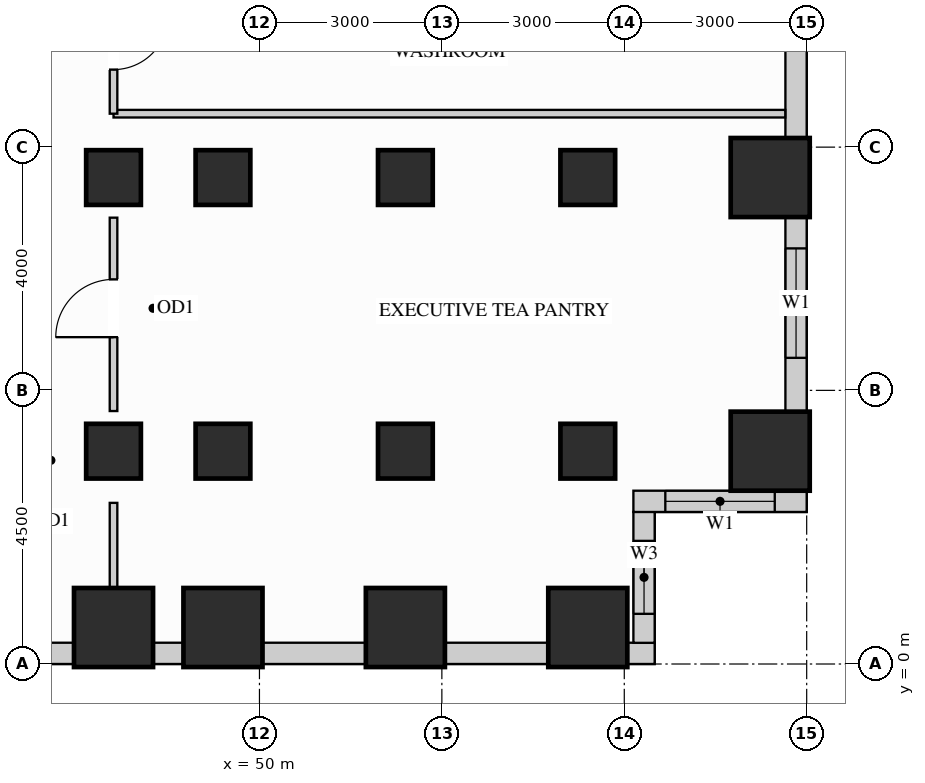
"""IFC4 building model, lengths in metres.
Left out: names, types, materials, properties, quantities, classifications, styles, units other than length and angle.
Written with IfcOpenShell. Run it as: python <this file> out.ifc"""

import sys

from ifc_helpers import new_model, si_unit, direction, frame, frame_2d, origin, origin_2d, place, context, subcontext, project, spatial, rectangle, extrude, source, transform, mapped, element, fill, save


model = new_model("IFC4")
c1 = context("Model", 3, precision=1e-05, world=origin(), true_north=direction((0.0, 1.0)))
c2 = subcontext(c1, "Body", "Model", "MODEL_VIEW")
j1 = project(units=[si_unit("LENGTHUNIT", "METRE"), si_unit("PLANEANGLEUNIT", "RADIAN")], contexts=[c1])
p1 = place(None, origin())
s1 = spatial("IfcSite", under=j1, at=p1, CompositionType="ELEMENT")
p2 = place(p1, origin())
s2 = spatial("IfcBuilding", under=s1, at=p2, CompositionType="ELEMENT")
p3 = place(p2, frame((0.0, 0.0, 69.3)))
s3 = spatial("IfcBuildingStorey", under=s2, at=p3, CompositionType="ELEMENT", Elevation=69.3)
m1 = source(origin(), c2, "Body", "SweptSolid", [
    extrude(rectangle(XDim=0.9, YDim=0.9, at=origin_2d()), origin(), (0.0, 0.0, 1.0), 3.32),
])
for number, where, z_axis, x_axis in (
    (1, (47.6, 3.5, 0.0), (0.0, 0.0, 1.0), (1.0, 0.0, 0.0)),
    (2, (47.6, 8.0, 0.0), (0.0, 0.0, 1.0), (1.0, 0.0, 0.0)),
    (3, (49.4, 3.5, 0.0), (0.0, 0.0, 1.0), (1.0, 0.0, 0.0)),
    (4, (49.4, 8.0, 0.0), (0.0, 0.0, 1.0), (1.0, 0.0, 0.0)),
    (5, (52.4, 3.5, 0.0), (0.0, 0.0, 1.0), (1.0, 0.0, 0.0)),
    (6, (52.4, 8.0, 0.0), (0.0, 0.0, 1.0), (1.0, 0.0, 0.0)),
    (7, (55.4, 3.5, 0.0), (0.0, 0.0, 1.0), (1.0, 0.0, 0.0)),
    (8, (55.4, 8.0, 0.0), (0.0, 0.0, 1.0), (1.0, 0.0, 0.0)),
):
    element("IfcColumn", number, at=place(p3, frame(where, z_axis=z_axis, x_axis=x_axis)), inside=s3, PredefinedType="COLUMN", context=c2, shape_type="MappedRepresentation", body=[
        mapped(m1, transform((0.0, 0.0, 0.0), x_axis=(1.0, 0.0, 0.0), y_axis=(0.0, 1.0, 0.0), z_axis=(0.0, 0.0, 1.0))),
    ])
m2 = source(origin(), c2, "Body", "SweptSolid", [
    extrude(rectangle(XDim=1.3, YDim=1.3, at=origin_2d()), origin(), (0.0, 0.0, 1.0), 3.32),
])
for number, where, z_axis, x_axis in (
    (9, (58.4, 3.5, 0.0), (0.0, 0.0, 1.0), (1.0, 0.0, 0.0)),
    (10, (58.4, 8.0, 0.0), (0.0, 0.0, 1.0), (1.0, 0.0, 0.0)),
    (11, (47.6, 0.6, 0.0), (0.0, 0.0, 1.0), (1.0, 0.0, 0.0)),
    (12, (49.4, 0.6, 0.0), (0.0, 0.0, 1.0), (1.0, 0.0, 0.0)),
    (13, (52.4, 0.6, 0.0), (0.0, 0.0, 1.0), (1.0, 0.0, 0.0)),
    (14, (55.4, 0.6, 0.0), (0.0, 0.0, 1.0), (1.0, 0.0, 0.0)),
):
    element("IfcColumn", number, at=place(p3, frame(where, z_axis=z_axis, x_axis=x_axis)), inside=s3, PredefinedType="COLUMN", context=c2, shape_type="MappedRepresentation", body=[
        mapped(m2, transform((0.0, 0.0, 0.0), x_axis=(1.0, 0.0, 0.0), y_axis=(0.0, 1.0, 0.0), z_axis=(0.0, 0.0, 1.0))),
    ])
p4 = place(p3, frame((40.648, 0.175, 0.0), z_axis=(0.0, 0.0, 1.0), x_axis=(1.0, 0.0, 0.0)))
e15 = element("IfcWall", 15, at=p4, inside=s3, PredefinedType="SOLIDWALL", context=c2, shape_type="SweptSolid", body=[
    extrude(rectangle(XDim=6.304, YDim=0.35, at=frame_2d((3.152, 0.0))), origin(), (0.0, 0.0, 1.0), 2.45),
])
p5 = place(p4, frame((0.687, 0.0, 0.78)))
e16 = element("IfcOpeningElement", 16, at=p5, cuts=e15, PredefinedType="OPENING", context=c2, shape_type="SweptSolid", body=[
    extrude(rectangle(XDim=1.8, YDim=1.49, at=frame_2d((0.9, 0.745))), frame((0.0, 0.185, 0.0), z_axis=(0.0, -1.0, 0.0), x_axis=(1.0, 0.0, 0.0)), (0.0, 0.0, 1.0), 0.37),
])
p6 = place(p4, frame((2.855, 0.0, 0.78)))
e17 = element("IfcOpeningElement", 17, at=p6, cuts=e15, PredefinedType="OPENING", context=c2, shape_type="SweptSolid", body=[
    extrude(rectangle(XDim=1.8, YDim=1.49, at=frame_2d((0.9, 0.745))), frame((0.0, 0.185, 0.0), z_axis=(0.0, -1.0, 0.0), x_axis=(1.0, 0.0, 0.0)), (0.0, 0.0, 1.0), 0.37),
])
m3 = source(origin(), c2, "Body", "SweptSolid", [
    extrude(rectangle(XDim=0.504, YDim=0.35, at=frame_2d((0.252, 0.0))), origin(), (0.0, 0.0, 1.0), 3.305),
])
p7 = place(p3, frame((48.248, 0.175, 0.0), z_axis=(0.0, 0.0, 1.0), x_axis=(1.0, 0.0, 0.0)))
e18 = element("IfcWall", 18, at=p7, inside=s3, PredefinedType="SOLIDWALL", context=c2, shape_type="MappedRepresentation", body=[
    mapped(m3, transform((0.0, 0.0, 0.0), x_axis=(1.0, 0.0, 0.0), y_axis=(0.0, 1.0, 0.0), z_axis=(0.0, 0.0, 1.0))),
])
m4 = source(origin(), c2, "Body", "SweptSolid", [
    extrude(rectangle(XDim=1.704, YDim=0.35, at=frame_2d((0.852, 0.0))), origin(), (0.0, 0.0, 1.0), 2.45),
])
for number, where, z_axis, x_axis in (
    (19, (50.048, 0.175, 0.0), (0.0, 0.0, 1.0), (1.0, 0.0, 0.0)),
    (20, (53.048, 0.175, 0.0), (0.0, 0.0, 1.0), (1.0, 0.0, 0.0)),
):
    element("IfcWall", number, at=place(p3, frame(where, z_axis=z_axis, x_axis=x_axis)), inside=s3, PredefinedType="SOLIDWALL", context=c2, shape_type="MappedRepresentation", body=[
        mapped(m4, transform((0.0, 0.0, 0.0), x_axis=(1.0, 0.0, 0.0), y_axis=(0.0, 1.0, 0.0), z_axis=(0.0, 0.0, 1.0))),
    ])
m5 = source(origin(), c2, "Body", "SweptSolid", [
    extrude(rectangle(XDim=0.452, YDim=0.35, at=frame_2d((0.226, 0.0))), origin(), (0.0, 0.0, 1.0), 3.305),
])
p8 = place(p3, frame((56.048, 0.175, 0.0), z_axis=(0.0, 0.0, 1.0), x_axis=(1.0, 0.0, 0.0)))
e21 = element("IfcWall", 21, at=p8, inside=s3, PredefinedType="SOLIDWALL", context=c2, shape_type="MappedRepresentation", body=[
    mapped(m5, transform((0.0, 0.0, 0.0), x_axis=(1.0, 0.0, 0.0), y_axis=(0.0, 1.0, 0.0), z_axis=(0.0, 0.0, 1.0))),
])
p9 = place(p3, frame((56.325, 0.348, 0.0), z_axis=(0.0, 0.0, 1.0), x_axis=(0.0, 1.0, 0.0)))
e22 = element("IfcWall", 22, at=p9, inside=s3, PredefinedType="SOLIDWALL", context=c2, shape_type="SweptSolid", body=[
    extrude(rectangle(XDim=2.154, YDim=0.35, at=frame_2d((1.077, 0.0))), origin(), (0.0, 0.0, 1.0), 3.305),
])
p10 = place(p9, frame((0.477, 0.0, 0.78)))
e23 = element("IfcOpeningElement", 23, at=p10, cuts=e22, PredefinedType="OPENING", context=c2, shape_type="SweptSolid", body=[
    extrude(rectangle(XDim=1.2, YDim=2.1, at=frame_2d((0.6, 1.05))), frame((0.0, 0.185, 0.0), z_axis=(0.0, -1.0, 0.0), x_axis=(1.0, 0.0, 0.0)), (0.0, 0.0, 1.0), 0.37),
])
p11 = place(p3, frame((56.15, 2.675, 0.0), z_axis=(0.0, 0.0, 1.0), x_axis=(1.0, 0.0, 0.0)))
e24 = element("IfcWall", 24, at=p11, inside=s3, PredefinedType="SOLIDWALL", context=c2, shape_type="SweptSolid", body=[
    extrude(rectangle(XDim=2.85, YDim=0.35, at=frame_2d((1.425, 0.0))), origin(), (0.0, 0.0, 1.0), 3.305),
])
p12 = place(p11, frame((0.525, 0.0, 0.78)))
e25 = element("IfcOpeningElement", 25, at=p12, cuts=e24, PredefinedType="OPENING", context=c2, shape_type="SweptSolid", body=[
    extrude(rectangle(XDim=1.8, YDim=2.1, at=frame_2d((0.9, 1.05))), frame((0.0, 0.185, 0.0), z_axis=(0.0, -1.0, 0.0), x_axis=(1.0, 0.0, 0.0)), (0.0, 0.0, 1.0), 0.37),
])
p13 = place(p3, frame((58.825, 4.148, 0.0), z_axis=(0.0, 0.0, 1.0), x_axis=(0.0, 1.0, 0.0)))
e26 = element("IfcWall", 26, at=p13, inside=s3, PredefinedType="SOLIDWALL", context=c2, shape_type="SweptSolid", body=[
    extrude(rectangle(XDim=3.204, YDim=0.35, at=frame_2d((1.602, 0.0))), origin(), (0.0, 0.0, 1.0), 2.45),
])
p14 = place(p13, frame((0.887, 0.0, 0.78)))
e27 = element("IfcOpeningElement", 27, at=p14, cuts=e26, PredefinedType="OPENING", context=c2, shape_type="SweptSolid", body=[
    extrude(rectangle(XDim=1.8, YDim=1.49, at=frame_2d((0.9, 0.745))), frame((0.0, 0.185, 0.0), z_axis=(0.0, -1.0, 0.0), x_axis=(1.0, 0.0, 0.0)), (0.0, 0.0, 1.0), 0.37),
])
m6 = source(origin(), c2, "Body", "SweptSolid", [
    extrude(rectangle(XDim=4.204, YDim=0.35, at=frame_2d((2.102, 0.0))), origin(), (0.0, 0.0, 1.0), 2.45),
])
p15 = place(p3, frame((58.825, 8.648, 0.0), z_axis=(0.0, 0.0, 1.0), x_axis=(0.0, 1.0, 0.0)))
e28 = element("IfcWall", 28, at=p15, inside=s3, PredefinedType="SOLIDWALL", context=c2, shape_type="MappedRepresentation", body=[
    mapped(m6, transform((0.0, 0.0, 0.0), x_axis=(1.0, 0.0, 0.0), y_axis=(0.0, 1.0, 0.0), z_axis=(0.0, 0.0, 1.0))),
])
m7 = source(origin(), c2, "Body", "SweptSolid", [
    extrude(rectangle(XDim=11.048, YDim=0.125, at=frame_2d((5.524, 0.0))), origin(), (0.0, 0.0, 1.0), 3.305),
])
p16 = place(p3, frame((47.6, 9.05, 0.0), z_axis=(0.0, 0.0, 1.0), x_axis=(1.0, 0.0, 0.0)))
e29 = element("IfcWall", 29, at=p16, inside=s3, PredefinedType="PARTITIONING", context=c2, shape_type="MappedRepresentation", body=[
    mapped(m7, transform((0.0, 0.0, 0.0), x_axis=(1.0, 0.0, 0.0), y_axis=(0.0, 1.0, 0.0), z_axis=(0.0, 0.0, 1.0))),
])
p17 = place(p3, frame((47.6, 4.16, 0.0), z_axis=(0.0, 0.0, 1.0), x_axis=(0.0, 1.0, 0.0)))
e30 = element("IfcWall", 30, at=p17, inside=s3, PredefinedType="PARTITIONING", context=c2, shape_type="SweptSolid", body=[
    extrude(rectangle(XDim=3.18, YDim=0.125, at=frame_2d((1.59, 0.0))), origin(), (0.0, 0.0, 1.0), 2.61),
])
p18 = place(p17, frame((1.215, 0.0, 0.0)))
e31 = element("IfcOpeningElement", 31, at=p18, cuts=e30, PredefinedType="OPENING", context=c2, shape_type="SweptSolid", body=[
    extrude(rectangle(XDim=0.95, YDim=2.15, at=frame_2d((0.475, 1.075))), frame((0.0, 0.073, 0.0), z_axis=(0.0, -1.0, 0.0), x_axis=(1.0, 0.0, 0.0)), (0.0, 0.0, 1.0), 0.145),
])
m8 = source(origin(), c2, "Body", "SweptSolid", [
    extrude(rectangle(XDim=1.39, YDim=0.125, at=frame_2d((0.695, 0.0))), origin(), (0.0, 0.0, 1.0), 2.61),
])
p19 = place(p3, frame((47.6, 1.26, 0.0), z_axis=(0.0, 0.0, 1.0), x_axis=(0.0, 1.0, 0.0)))
e32 = element("IfcWall", 32, at=p19, inside=s3, PredefinedType="PARTITIONING", context=c2, shape_type="MappedRepresentation", body=[
    mapped(m8, transform((0.0, 0.0, 0.0), x_axis=(1.0, 0.0, 0.0), y_axis=(0.0, 1.0, 0.0), z_axis=(0.0, 0.0, 1.0))),
])
p20 = place(p3, frame((47.6, 9.05, 0.0), z_axis=(0.0, 0.0, 1.0), x_axis=(0.0, 1.0, 0.0)))
e33 = element("IfcWall", 33, at=p20, inside=s3, PredefinedType="PARTITIONING", context=c2, shape_type="SweptSolid", body=[
    extrude(rectangle(XDim=2.4, YDim=0.125, at=frame_2d((1.2, 0.0))), origin(), (0.0, 0.0, 1.0), 2.61),
])
p21 = place(p20, frame((0.725, 0.0, 0.0)))
e34 = element("IfcOpeningElement", 34, at=p21, cuts=e33, PredefinedType="OPENING", context=c2, shape_type="SweptSolid", body=[
    extrude(rectangle(XDim=0.9, YDim=2.15, at=frame_2d((0.45, 1.075))), frame((0.0, 0.073, 0.0), z_axis=(0.0, -1.0, 0.0), x_axis=(1.0, 0.0, 0.0)), (0.0, 0.0, 1.0), 0.145),
])
m9 = source(origin(), c2, "Body", "SweptSolid", [
    extrude(rectangle(XDim=0.95, YDim=2.15, at=frame_2d((0.475, 1.075))), frame((0.0, 0.025, 0.0), z_axis=(0.0, -1.0, 0.0), x_axis=(1.0, 0.0, 0.0)), (0.0, 0.0, 1.0), 0.05),
])
p22 = place(p18, origin())
e35 = element("IfcDoor", 35, at=p22, inside=s3, OperationType="SINGLE_SWING_LEFT", PredefinedType="DOOR", context=c2, shape_type="MappedRepresentation", body=[
    mapped(m9, transform((0.0, 0.0, 0.0), x_axis=(1.0, 0.0, 0.0), y_axis=(0.0, 1.0, 0.0), z_axis=(0.0, 0.0, 1.0))),
])
fill(e31, e35)
m10 = source(origin(), c2, "Body", "SweptSolid", [
    extrude(rectangle(XDim=0.9, YDim=2.15, at=frame_2d((0.45, 1.075))), frame((0.0, 0.025, 0.0), z_axis=(0.0, -1.0, 0.0), x_axis=(1.0, 0.0, 0.0)), (0.0, 0.0, 1.0), 0.05),
])
p23 = place(p21, origin())
e36 = element("IfcDoor", 36, at=p23, inside=s3, OperationType="SINGLE_SWING_RIGHT", PredefinedType="DOOR", context=c2, shape_type="MappedRepresentation", body=[
    mapped(m10, transform((0.0, 0.0, 0.0), x_axis=(1.0, 0.0, 0.0), y_axis=(0.0, 1.0, 0.0), z_axis=(0.0, 0.0, 1.0))),
])
fill(e34, e36)
m11 = source(origin(), c2, "Body", "SweptSolid", [
    extrude(rectangle(XDim=1.8, YDim=2.1, at=frame_2d((0.9, 1.05))), frame((0.0, 0.03, 0.0), z_axis=(0.0, -1.0, 0.0), x_axis=(1.0, 0.0, 0.0)), (0.0, 0.0, 1.0), 0.06),
])
p24 = place(p12, origin())
e37 = element("IfcWindow", 37, at=p24, inside=s3, PartitioningType="SINGLE_PANEL", PredefinedType="WINDOW", context=c2, shape_type="MappedRepresentation", body=[
    mapped(m11, transform((0.0, 0.0, 0.0), x_axis=(1.0, 0.0, 0.0), y_axis=(0.0, 1.0, 0.0), z_axis=(0.0, 0.0, 1.0))),
])
fill(e25, e37)
m12 = source(origin(), c2, "Body", "SweptSolid", [
    extrude(rectangle(XDim=1.8, YDim=1.49, at=frame_2d((0.9, 0.745))), frame((0.0, 0.03, 0.0), z_axis=(0.0, -1.0, 0.0), x_axis=(1.0, 0.0, 0.0)), (0.0, 0.0, 1.0), 0.06),
])
p25 = place(p14, origin())
e38 = element("IfcWindow", 38, at=p25, inside=s3, PartitioningType="SINGLE_PANEL", PredefinedType="WINDOW", context=c2, shape_type="MappedRepresentation", body=[
    mapped(m12, transform((0.0, 0.0, 0.0), x_axis=(1.0, 0.0, 0.0), y_axis=(0.0, 1.0, 0.0), z_axis=(0.0, 0.0, 1.0))),
])
fill(e27, e38)
m13 = source(origin(), c2, "Body", "SweptSolid", [
    extrude(rectangle(XDim=1.2, YDim=2.1, at=frame_2d((0.6, 1.05))), frame((0.0, 0.03, 0.0), z_axis=(0.0, -1.0, 0.0), x_axis=(1.0, 0.0, 0.0)), (0.0, 0.0, 1.0), 0.06),
])
p26 = place(p10, origin())
e39 = element("IfcWindow", 39, at=p26, inside=s3, PartitioningType="SINGLE_PANEL", PredefinedType="WINDOW", context=c2, shape_type="MappedRepresentation", body=[
    mapped(m13, transform((0.0, 0.0, 0.0), x_axis=(1.0, 0.0, 0.0), y_axis=(0.0, 1.0, 0.0), z_axis=(0.0, 0.0, 1.0))),
])
fill(e23, e39)
save(model, sys.argv[1])
